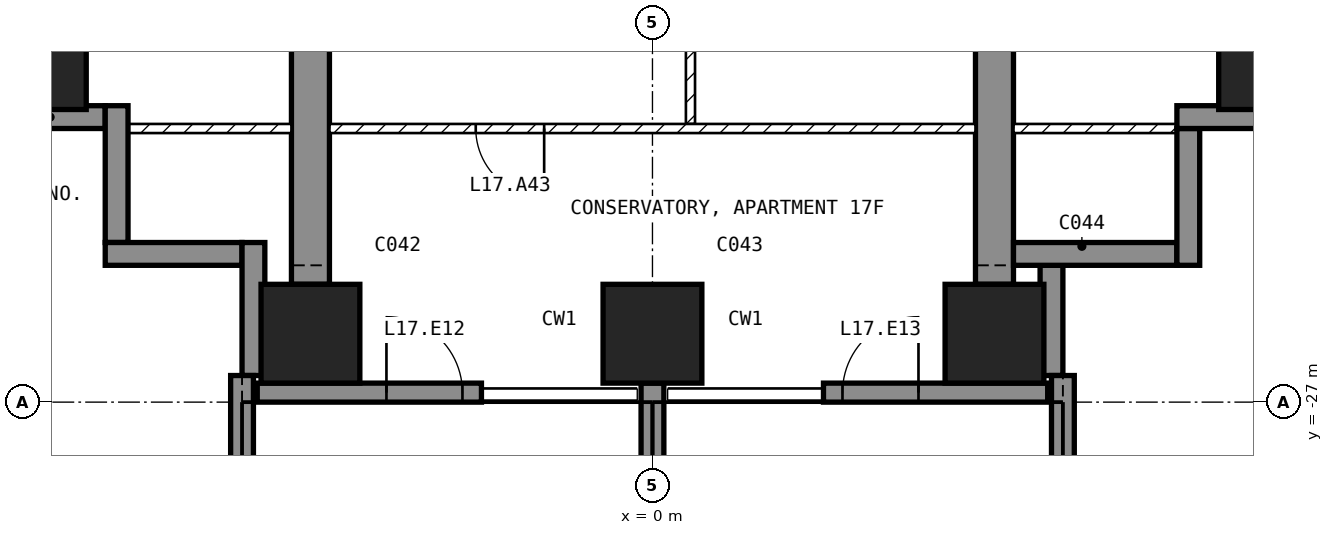
"""IFC4 building model, lengths in metres.
Left out: names, types, materials, properties, quantities, classifications, styles, units other than length and angle.
Written with IfcOpenShell. Run it as: python <this file> out.ifc"""

import sys

from ifc_helpers import new_model, si_unit, direction, frame, frame_2d, origin, origin_2d, place, context, subcontext, project, spatial, polyline, rectangle, outline, extrude, element, fill, save


model = new_model("IFC4")
c1 = context("Model", 3, precision=1e-05, world=origin(), true_north=direction((0.0, 1.0)))
c2 = subcontext(c1, "Body", "Model", "MODEL_VIEW")
j1 = project(units=[si_unit("LENGTHUNIT", "METRE"), si_unit("PLANEANGLEUNIT", "RADIAN")], contexts=[c1])
p1 = place(None, origin())
s1 = spatial("IfcSite", under=j1, at=p1, CompositionType="ELEMENT")
p2 = place(p1, origin())
s2 = spatial("IfcBuilding", under=s1, at=p2, CompositionType="ELEMENT")
p3 = place(p2, frame((0.0, 0.0, 78.5)))
s3 = spatial("IfcBuildingStorey", under=s2, at=p3, CompositionType="ELEMENT", Elevation=78.5)
for number, where, z_axis, x_axis in (
    (1, (-8.1, -22.5, -0.25), (0.0, 0.0, 1.0), (1.0, 0.0, 0.0)),
    (2, (-4.5, -26.1, -0.25), (0.0, 0.0, 1.0), (1.0, 0.0, 0.0)),
    (3, (0.0, -26.1, -0.25), (0.0, 0.0, 1.0), (1.0, 0.0, 0.0)),
    (4, (4.5, -26.1, -0.25), (0.0, 0.0, 1.0), (1.0, 0.0, 0.0)),
    (5, (8.1, -22.5, -0.25), (0.0, 0.0, 1.0), (1.0, 0.0, 0.0)),
):
    element("IfcColumn", number, at=place(p3, frame(where, z_axis=z_axis, x_axis=x_axis)), inside=s3, PredefinedType="COLUMN", context=c2, shape_type="SweptSolid", body=[
        extrude(rectangle(XDim=1.3, YDim=1.3, at=origin_2d()), origin(), (0.0, 0.0, 1.0), 3.5),
    ])
for number, where, z_axis, x_axis in (
    (6, (-4.75, -25.45, -0.25), (1.0, 0.0, 0.0), (0.0, 1.0, 0.0)),
    (7, (4.25, -25.45, -0.25), (1.0, 0.0, 0.0), (0.0, 1.0, 0.0)),
):
    element("IfcWall", number, at=place(p3, frame(where, z_axis=z_axis, x_axis=x_axis)), inside=s3, PredefinedType="SHEAR", context=c2, shape_type="SweptSolid", body=[
        extrude(outline(polyline([(0.0, 0.0), (4.15, 0.0), (4.15, 2.65), (6.55, 2.65), (6.55, 0.0), (11.95, 0.0), (11.95, 2.65), (14.35, 2.65), (14.35, 0.0), (16.45, 0.0), (16.45, 3.5), (0.0, 3.5), (0.0, 0.0)])), origin(), (0.0, 0.0, 1.0), 0.5),
    ])
p4 = place(p3, frame((-5.2, -26.875, 0.0), z_axis=(0.0, 0.0, 1.0), x_axis=(1.0, 0.0, 0.0)))
e8 = element("IfcWall", 8, at=p4, inside=s3, PredefinedType="SOLIDWALL", context=c2, shape_type="SweptSolid", body=[
    extrude(rectangle(XDim=2.95, YDim=0.25, at=frame_2d((1.475, 0.0))), origin(), (0.0, 0.0, 1.0), 3.25),
])
p5 = place(p4, frame((1.7, 0.0, 0.0)))
e9 = element("IfcOpeningElement", 9, at=p5, cuts=e8, PredefinedType="OPENING", context=c2, shape_type="SweptSolid", body=[
    extrude(rectangle(XDim=1.0, YDim=2.4, at=frame_2d((0.5, 1.2))), frame((0.0, 0.135, 0.0), z_axis=(0.0, -1.0, 0.0), x_axis=(1.0, 0.0, 0.0)), (0.0, 0.0, 1.0), 0.27),
])
p6 = place(p3, frame((2.25, -26.875, 0.0), z_axis=(0.0, 0.0, 1.0), x_axis=(1.0, 0.0, 0.0)))
e10 = element("IfcWall", 10, at=p6, inside=s3, PredefinedType="SOLIDWALL", context=c2, shape_type="SweptSolid", body=[
    extrude(rectangle(XDim=2.95, YDim=0.25, at=frame_2d((1.475, 0.0))), origin(), (0.0, 0.0, 1.0), 3.25),
])
p7 = place(p6, frame((0.25, 0.0, 0.0)))
e11 = element("IfcOpeningElement", 11, at=p7, cuts=e10, PredefinedType="OPENING", context=c2, shape_type="SweptSolid", body=[
    extrude(rectangle(XDim=1.0, YDim=2.4, at=frame_2d((0.5, 1.2))), frame((0.0, 0.135, 0.0), z_axis=(0.0, -1.0, 0.0), x_axis=(1.0, 0.0, 0.0)), (0.0, 0.0, 1.0), 0.27),
])
p8 = place(p3, frame((5.25, -26.65, 0.0), z_axis=(0.0, 0.0, 1.0), x_axis=(0.0, 1.0, 0.0)))
e12 = element("IfcWall", 12, at=p8, inside=s3, PredefinedType="SOLIDWALL", context=c2, shape_type="SweptSolid", body=[
    extrude(rectangle(XDim=1.45, YDim=0.3, at=frame_2d((0.725, 0.0))), origin(), (0.0, 0.0, 1.0), 3.25),
])
p9 = place(p3, frame((4.75, -25.05, 0.0), z_axis=(0.0, 0.0, 1.0), x_axis=(1.0, 0.0, 0.0)))
e13 = element("IfcWall", 13, at=p9, inside=s3, PredefinedType="SOLIDWALL", context=c2, shape_type="SweptSolid", body=[
    extrude(rectangle(XDim=2.15, YDim=0.3, at=frame_2d((1.075, 0.0))), origin(), (0.0, 0.0, 1.0), 3.25),
])
p10 = place(p3, frame((7.05, -25.2, 0.0), z_axis=(0.0, 0.0, 1.0), x_axis=(0.0, 1.0, 0.0)))
e14 = element("IfcWall", 14, at=p10, inside=s3, PredefinedType="SOLIDWALL", context=c2, shape_type="SweptSolid", body=[
    extrude(rectangle(XDim=1.8, YDim=0.3, at=frame_2d((0.9, 0.0))), origin(), (0.0, 0.0, 1.0), 3.25),
])
p11 = place(p3, frame((6.9, -23.25, 0.0), z_axis=(0.0, 0.0, 1.0), x_axis=(1.0, 0.0, 0.0)))
e15 = element("IfcWall", 15, at=p11, inside=s3, PredefinedType="SOLIDWALL", context=c2, shape_type="SweptSolid", body=[
    extrude(rectangle(XDim=1.75, YDim=0.3, at=frame_2d((0.875, 0.0))), origin(), (0.0, 0.0, 1.0), 3.25),
])
p12 = place(p3, frame((-8.65, -23.25, 0.0), z_axis=(0.0, 0.0, 1.0), x_axis=(1.0, 0.0, 0.0)))
e16 = element("IfcWall", 16, at=p12, inside=s3, PredefinedType="SOLIDWALL", context=c2, shape_type="SweptSolid", body=[
    extrude(rectangle(XDim=1.45, YDim=0.3, at=frame_2d((0.725, 0.0))), origin(), (0.0, 0.0, 1.0), 3.25),
])
p13 = place(p3, frame((-7.05, -23.1, 0.0), z_axis=(0.0, 0.0, 1.0), x_axis=(0.0, -1.0, 0.0)))
e17 = element("IfcWall", 17, at=p13, inside=s3, PredefinedType="SOLIDWALL", context=c2, shape_type="SweptSolid", body=[
    extrude(rectangle(XDim=1.8, YDim=0.3, at=frame_2d((0.9, 0.0))), origin(), (0.0, 0.0, 1.0), 3.25),
])
p14 = place(p3, frame((-7.2, -25.05, 0.0), z_axis=(0.0, 0.0, 1.0), x_axis=(1.0, 0.0, 0.0)))
e18 = element("IfcWall", 18, at=p14, inside=s3, PredefinedType="SOLIDWALL", context=c2, shape_type="SweptSolid", body=[
    extrude(rectangle(XDim=1.8, YDim=0.3, at=frame_2d((0.9, 0.0))), origin(), (0.0, 0.0, 1.0), 3.25),
])
p15 = place(p3, frame((-5.25, -24.9, 0.0), z_axis=(0.0, 0.0, 1.0), x_axis=(0.0, -1.0, 0.0)))
e19 = element("IfcWall", 19, at=p15, inside=s3, PredefinedType="SOLIDWALL", context=c2, shape_type="SweptSolid", body=[
    extrude(rectangle(XDim=1.75, YDim=0.3, at=frame_2d((0.875, 0.0))), origin(), (0.0, 0.0, 1.0), 3.25),
])
p16 = place(p3, frame((-5.4, -26.65, 0.0), z_axis=(0.0, 0.0, 1.0), x_axis=(0.0, -1.0, 0.0)))
e20 = element("IfcWall", 20, at=p16, inside=s3, PredefinedType="SOLIDWALL", context=c2, shape_type="SweptSolid", body=[
    extrude(rectangle(XDim=3.05, YDim=0.3, at=frame_2d((1.525, 0.0))), origin(), (0.0, 0.0, 1.0), 3.25),
])
p17 = place(p3, frame((0.0, -26.75, 0.0), z_axis=(0.0, 0.0, 1.0), x_axis=(0.0, -1.0, 0.0)))
e21 = element("IfcWall", 21, at=p17, inside=s3, PredefinedType="SOLIDWALL", context=c2, shape_type="SweptSolid", body=[
    extrude(rectangle(XDim=2.95, YDim=0.3, at=frame_2d((1.475, 0.0))), origin(), (0.0, 0.0, 1.0), 3.25),
])
p18 = place(p3, frame((5.4, -26.65, 0.0), z_axis=(0.0, 0.0, 1.0), x_axis=(0.0, -1.0, 0.0)))
e22 = element("IfcWall", 22, at=p18, inside=s3, PredefinedType="SOLIDWALL", context=c2, shape_type="SweptSolid", body=[
    extrude(rectangle(XDim=3.05, YDim=0.3, at=frame_2d((1.525, 0.0))), origin(), (0.0, 0.0, 1.0), 3.25),
])
p19 = place(p3, frame((0.5, -18.96, 0.0), z_axis=(0.0, 0.0, 1.0), x_axis=(0.0, -1.0, 0.0)))
e23 = element("IfcWall", 23, at=p19, inside=s3, PredefinedType="PARTITIONING", context=c2, shape_type="SweptSolid", body=[
    extrude(rectangle(XDim=4.38, YDim=0.12, at=frame_2d((2.19, 0.0))), origin(), (0.0, 0.0, 1.0), 3.25),
])
p20 = place(p19, frame((1.74, 0.0, 0.0)))
e24 = element("IfcOpeningElement", 24, at=p20, cuts=e23, PredefinedType="OPENING", context=c2, shape_type="SweptSolid", body=[
    extrude(rectangle(XDim=0.9, YDim=2.1, at=frame_2d((0.45, 1.05))), frame((0.0, 0.07, 0.0), z_axis=(0.0, -1.0, 0.0), x_axis=(1.0, 0.0, 0.0)), (0.0, 0.0, 1.0), 0.14),
])
p21 = place(p3, frame((4.25, -23.4, 0.0), z_axis=(0.0, 0.0, 1.0), x_axis=(-1.0, 0.0, 0.0)))
e25 = element("IfcWall", 25, at=p21, inside=s3, PredefinedType="PARTITIONING", context=c2, shape_type="SweptSolid", body=[
    extrude(rectangle(XDim=8.5, YDim=0.12, at=frame_2d((4.25, 0.0))), origin(), (0.0, 0.0, 1.0), 3.25),
])
p22 = place(p21, frame((5.675, 0.0, 0.0)))
e26 = element("IfcOpeningElement", 26, at=p22, cuts=e25, PredefinedType="OPENING", context=c2, shape_type="SweptSolid", body=[
    extrude(rectangle(XDim=0.9, YDim=2.1, at=frame_2d((0.45, 1.05))), frame((0.0, 0.07, 0.0), z_axis=(0.0, -1.0, 0.0), x_axis=(1.0, 0.0, 0.0)), (0.0, 0.0, 1.0), 0.14),
])
for number, where, z_axis, x_axis in (
    (27, (7.12, -23.4, 0.0), (0.0, 0.0, 1.0), (-1.0, 0.0, 0.0)),
    (28, (-4.75, -23.4, 0.0), (0.0, 0.0, 1.0), (-1.0, 0.0, 0.0)),
):
    element("IfcWall", number, at=place(p3, frame(where, z_axis=z_axis, x_axis=x_axis)), inside=s3, PredefinedType="PARTITIONING", context=c2, shape_type="SweptSolid", body=[
        extrude(rectangle(XDim=2.37, YDim=0.12, at=frame_2d((1.185, 0.0))), origin(), (0.0, 0.0, 1.0), 3.25),
    ])
p23 = place(p5, origin())
e29 = element("IfcDoor", 29, at=p23, inside=s3, OperationType="SINGLE_SWING_LEFT", PredefinedType="DOOR", context=c2, shape_type="SweptSolid", body=[
    extrude(rectangle(XDim=1.0, YDim=2.4, at=frame_2d((0.5, 1.2))), frame((0.0, 0.025, 0.0), z_axis=(0.0, -1.0, 0.0), x_axis=(1.0, 0.0, 0.0)), (0.0, 0.0, 1.0), 0.05),
])
fill(e9, e29)
p24 = place(p7, origin())
e30 = element("IfcDoor", 30, at=p24, inside=s3, OperationType="SINGLE_SWING_RIGHT", PredefinedType="DOOR", context=c2, shape_type="SweptSolid", body=[
    extrude(rectangle(XDim=1.0, YDim=2.4, at=frame_2d((0.5, 1.2))), frame((0.0, 0.025, 0.0), z_axis=(0.0, -1.0, 0.0), x_axis=(1.0, 0.0, 0.0)), (0.0, 0.0, 1.0), 0.05),
])
fill(e11, e30)
p25 = place(p22, origin())
e31 = element("IfcDoor", 31, at=p25, inside=s3, OperationType="SINGLE_SWING_LEFT", PredefinedType="DOOR", context=c2, shape_type="SweptSolid", body=[
    extrude(rectangle(XDim=0.9, YDim=2.1, at=frame_2d((0.45, 1.05))), frame((0.0, 0.025, 0.0), z_axis=(0.0, -1.0, 0.0), x_axis=(1.0, 0.0, 0.0)), (0.0, 0.0, 1.0), 0.05),
])
fill(e26, e31)
save(model, sys.argv[1])
